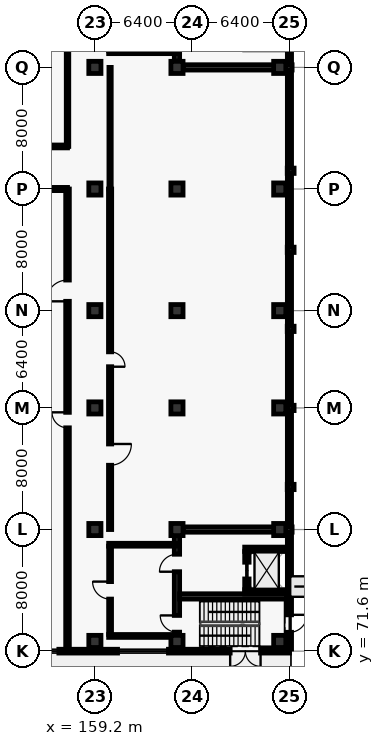
"""IFC4 building model, lengths in metres.
Left out: names, types, materials, properties, quantities, classifications, styles, units other than length and angle.
Written with IfcOpenShell. Run it as: python <this file> out.ifc"""

import sys

from ifc_helpers import new_model, si_unit, direction, frame, frame_2d, origin, origin_2d, place, context, subcontext, project, spatial, rectangle, extrude, element, fill, save


model = new_model("IFC4")
c1 = context("Model", 3, precision=1e-05, world=origin(), true_north=direction((0.0, 1.0)))
c2 = subcontext(c1, "Body", "Model", "MODEL_VIEW")
j1 = project(units=[si_unit("LENGTHUNIT", "METRE"), si_unit("PLANEANGLEUNIT", "RADIAN")], contexts=[c1])
p1 = place(None, origin())
s1 = spatial("IfcSite", under=j1, at=p1, CompositionType="ELEMENT")
p2 = place(p1, origin())
s2 = spatial("IfcBuilding", under=s1, at=p2, CompositionType="ELEMENT")
p3 = place(p2, origin())
s3 = spatial("IfcBuildingStorey", under=s2, at=p3, CompositionType="ELEMENT", Elevation=0.0)
for number, where, z_axis, x_axis in (
    (1, (159.2, 72.24, 0.0), (0.0, 0.0, 1.0), (1.0, 0.0, 0.0)),
    (2, (159.2, 79.6, 0.0), (0.0, 0.0, 1.0), (1.0, 0.0, 0.0)),
    (3, (159.2, 87.6, 0.0), (0.0, 0.0, 1.0), (1.0, 0.0, 0.0)),
    (4, (159.2, 94.0, 0.0), (0.0, 0.0, 1.0), (1.0, 0.0, 0.0)),
    (5, (159.2, 102.0, 0.0), (0.0, 0.0, 1.0), (1.0, 0.0, 0.0)),
    (6, (159.2, 110.0, 0.0), (0.0, 0.0, 1.0), (1.0, 0.0, 0.0)),
    (7, (164.6, 72.24, 0.0), (0.0, 0.0, 1.0), (1.0, 0.0, 0.0)),
    (8, (164.6, 79.6, 0.0), (0.0, 0.0, 1.0), (1.0, 0.0, 0.0)),
    (9, (164.6, 87.6, 0.0), (0.0, 0.0, 1.0), (1.0, 0.0, 0.0)),
    (10, (164.6, 94.0, 0.0), (0.0, 0.0, 1.0), (1.0, 0.0, 0.0)),
    (11, (164.6, 102.0, 0.0), (0.0, 0.0, 1.0), (1.0, 0.0, 0.0)),
    (12, (164.6, 110.0, 0.0), (0.0, 0.0, 1.0), (1.0, 0.0, 0.0)),
    (13, (171.36, 72.24, 0.0), (0.0, 0.0, 1.0), (1.0, 0.0, 0.0)),
    (14, (171.36, 79.6, 0.0), (0.0, 0.0, 1.0), (1.0, 0.0, 0.0)),
    (15, (171.36, 87.6, 0.0), (0.0, 0.0, 1.0), (1.0, 0.0, 0.0)),
    (16, (171.36, 94.0, 0.0), (0.0, 0.0, 1.0), (1.0, 0.0, 0.0)),
    (17, (171.36, 102.0, 0.0), (0.0, 0.0, 1.0), (1.0, 0.0, 0.0)),
    (18, (171.36, 110.0, 0.0), (0.0, 0.0, 1.0), (1.0, 0.0, 0.0)),
):
    element("IfcColumn", number, at=place(p3, frame(where, z_axis=z_axis, x_axis=x_axis)), inside=s3, PredefinedType="COLUMN", context=c2, shape_type="SweptSolid", body=[
        extrude(rectangle(XDim=0.8, YDim=0.8, at=origin_2d()), origin(), (0.0, 0.0, 1.0), 5.4),
    ])
for number, where, z_axis, x_axis in (
    (19, (172.08, 82.4, 0.0), (0.0, 0.0, 1.0), (1.0, 0.0, 0.0)),
    (20, (172.08, 87.6, 0.0), (0.0, 0.0, 1.0), (1.0, 0.0, 0.0)),
    (21, (172.08, 92.8, 0.0), (0.0, 0.0, 1.0), (1.0, 0.0, 0.0)),
    (22, (172.08, 98.0, 0.0), (0.0, 0.0, 1.0), (1.0, 0.0, 0.0)),
    (23, (172.08, 103.2, 0.0), (0.0, 0.0, 1.0), (1.0, 0.0, 0.0)),
):
    element("IfcColumn", number, at=place(p3, frame(where, z_axis=z_axis, x_axis=x_axis)), inside=s3, PredefinedType="PILASTER", context=c2, shape_type="SweptSolid", body=[
        extrude(rectangle(XDim=0.35, YDim=0.45, at=origin_2d()), origin(), (0.0, 0.0, 1.0), 5.4),
    ])
p4 = place(p3, frame((172.0, 117.86, 0.0), z_axis=(0.0, 0.0, 1.0), x_axis=(0.0, -1.0, 0.0)))
e24 = element("IfcWall", 24, at=p4, inside=s3, PredefinedType="SOLIDWALL", context=c2, shape_type="SweptSolid", body=[
    extrude(rectangle(XDim=46.12, YDim=0.275, at=frame_2d((23.06, 0.0))), origin(), (0.0, 0.0, 1.0), 5.14),
])
p5 = place(p4, frame((43.87, 0.0, 0.0)))
e25 = element("IfcOpeningElement", 25, at=p5, cuts=e24, PredefinedType="OPENING", context=c2, shape_type="SweptSolid", body=[
    extrude(rectangle(XDim=1.15, YDim=2.2, at=frame_2d((0.575, 1.1))), frame((0.0, 0.147, 0.0), z_axis=(0.0, -1.0, 0.0), x_axis=(1.0, 0.0, 0.0)), (0.0, 0.0, 1.0), 0.295),
])
p6 = place(p4, frame((1.1, 0.0, 0.0)))
e26 = element("IfcOpeningElement", 26, at=p6, cuts=e24, PredefinedType="OPENING", context=c2, shape_type="SweptSolid", body=[
    extrude(rectangle(XDim=1.15, YDim=2.2, at=frame_2d((0.575, 1.1))), frame((0.0, 0.147, 0.0), z_axis=(0.0, -1.0, 0.0), x_axis=(1.0, 0.0, 0.0)), (0.0, 0.0, 1.0), 0.295),
])
p7 = place(p3, frame((172.0, 71.6, 0.0), z_axis=(0.0, 0.0, 1.0), x_axis=(-1.0, 0.0, 0.0)))
e27 = element("IfcWall", 27, at=p7, inside=s3, PredefinedType="SOLIDWALL", context=c2, shape_type="SweptSolid", body=[
    extrude(rectangle(XDim=32.4, YDim=0.25, at=frame_2d((16.2, 0.0))), origin(), (0.0, 0.0, 1.0), 4.45),
])
p8 = place(p7, frame((1.9, 0.0, 0.0)))
e28 = element("IfcOpeningElement", 28, at=p8, cuts=e27, PredefinedType="OPENING", context=c2, shape_type="SweptSolid", body=[
    extrude(rectangle(XDim=2.0, YDim=2.5, at=frame_2d((1.0, 1.25))), frame((0.0, 0.135, 0.0), z_axis=(0.0, -1.0, 0.0), x_axis=(1.0, 0.0, 0.0)), (0.0, 0.0, 1.0), 0.27),
])
p9 = place(p7, frame((7.96, 0.0, 0.8)))
e29 = element("IfcOpeningElement", 29, at=p9, cuts=e27, PredefinedType="OPENING", context=c2, shape_type="SweptSolid", body=[
    extrude(rectangle(XDim=3.35, YDim=2.9, at=frame_2d((1.675, 1.45))), frame((0.0, 0.135, 0.0), z_axis=(0.0, -1.0, 0.0), x_axis=(1.0, 0.0, 0.0)), (0.0, 0.0, 1.0), 0.27),
])
p10 = place(p7, frame((15.17, 0.0, 0.8)))
e30 = element("IfcOpeningElement", 30, at=p10, cuts=e27, PredefinedType="OPENING", context=c2, shape_type="SweptSolid", body=[
    extrude(rectangle(XDim=3.65, YDim=2.9, at=frame_2d((1.825, 1.45))), frame((0.0, 0.135, 0.0), z_axis=(0.0, -1.0, 0.0), x_axis=(1.0, 0.0, 0.0)), (0.0, 0.0, 1.0), 0.27),
])
p11 = place(p7, frame((19.48, 0.0, 0.8)))
e31 = element("IfcOpeningElement", 31, at=p11, cuts=e27, PredefinedType="OPENING", context=c2, shape_type="SweptSolid", body=[
    extrude(rectangle(XDim=1.4, YDim=2.1, at=frame_2d((0.7, 1.05))), frame((0.0, 0.135, 0.0), z_axis=(0.0, -1.0, 0.0), x_axis=(1.0, 0.0, 0.0)), (0.0, 0.0, 1.0), 0.27),
])
p12 = place(p7, frame((25.24, 0.0, 0.8)))
e32 = element("IfcOpeningElement", 32, at=p12, cuts=e27, PredefinedType="OPENING", context=c2, shape_type="SweptSolid", body=[
    extrude(rectangle(XDim=1.5, YDim=2.1, at=frame_2d((0.75, 1.05))), frame((0.0, 0.135, 0.0), z_axis=(0.0, -1.0, 0.0), x_axis=(1.0, 0.0, 0.0)), (0.0, 0.0, 1.0), 0.27),
])
p13 = place(p3, frame((165.002, 79.6, 0.0), z_axis=(0.0, 0.0, 1.0), x_axis=(1.0, 0.0, 0.0)))
e33 = element("IfcWall", 33, at=p13, inside=s3, PredefinedType="SHEAR", context=c2, shape_type="SweptSolid", body=[
    extrude(rectangle(XDim=7.173, YDim=0.35, at=frame_2d((3.586, 0.0))), origin(), (0.0, 0.0, 1.0), 5.14),
])
p14 = place(p3, frame((164.6, 71.775, 0.0), z_axis=(0.0, 0.0, 1.0), x_axis=(0.0, 1.0, 0.0)))
e34 = element("IfcWall", 34, at=p14, inside=s3, PredefinedType="SHEAR", context=c2, shape_type="SweptSolid", body=[
    extrude(rectangle(XDim=7.423, YDim=0.35, at=frame_2d((3.711, 0.0))), origin(), (0.0, 0.0, 1.0), 5.14),
])
p15 = place(p14, frame((1.075, 0.0, 0.0)))
e35 = element("IfcOpeningElement", 35, at=p15, cuts=e34, PredefinedType="OPENING", context=c2, shape_type="SweptSolid", body=[
    extrude(rectangle(XDim=1.1, YDim=2.15, at=frame_2d((0.55, 1.075))), frame((0.0, 0.185, 0.0), z_axis=(0.0, -1.0, 0.0), x_axis=(1.0, 0.0, 0.0)), (0.0, 0.0, 1.0), 0.37),
])
p16 = place(p14, frame((5.05, 0.0, 0.0)))
e36 = element("IfcOpeningElement", 36, at=p16, cuts=e34, PredefinedType="OPENING", context=c2, shape_type="SweptSolid", body=[
    extrude(rectangle(XDim=1.15, YDim=2.2, at=frame_2d((0.575, 1.1))), frame((0.0, 0.185, 0.0), z_axis=(0.0, -1.0, 0.0), x_axis=(1.0, 0.0, 0.0)), (0.0, 0.0, 1.0), 0.37),
])
p17 = place(p3, frame((164.775, 75.2, 0.0), z_axis=(0.0, 0.0, 1.0), x_axis=(1.0, 0.0, 0.0)))
e37 = element("IfcWall", 37, at=p17, inside=s3, PredefinedType="SHEAR", context=c2, shape_type="SweptSolid", body=[
    extrude(rectangle(XDim=7.05, YDim=0.35, at=frame_2d((3.525, 0.0))), origin(), (0.0, 0.0, 1.0), 5.14),
])
for number, where, z_axis, x_axis in (
    (38, (169.055, 75.5, 0.0), (0.0, 0.0, 1.0), (1.0, 0.0, 0.0)),
    (39, (169.055, 78.3, 0.0), (0.0, 0.0, 1.0), (1.0, 0.0, 0.0)),
):
    element("IfcWall", number, at=place(p3, frame(where, z_axis=z_axis, x_axis=x_axis)), inside=s3, PredefinedType="SHEAR", context=c2, shape_type="SweptSolid", body=[
        extrude(rectangle(XDim=2.89, YDim=0.29, at=frame_2d((1.445, 0.0))), origin(), (0.0, 0.0, 1.0), 5.14),
    ])
p18 = place(p3, frame((169.2, 75.645, 0.0), z_axis=(0.0, 0.0, 1.0), x_axis=(0.0, 1.0, 0.0)))
e40 = element("IfcWall", 40, at=p18, inside=s3, PredefinedType="SHEAR", context=c2, shape_type="SweptSolid", body=[
    extrude(rectangle(XDim=2.51, YDim=0.29, at=frame_2d((1.255, 0.0))), origin(), (0.0, 0.0, 1.0), 5.14),
])
p19 = place(p18, frame((0.705, 0.0, 0.0)))
e41 = element("IfcOpeningElement", 41, at=p19, cuts=e40, PredefinedType="OPENING", context=c2, shape_type="SweptSolid", body=[
    extrude(rectangle(XDim=1.1, YDim=2.15, at=frame_2d((0.55, 1.075))), frame((0.0, 0.155, 0.0), z_axis=(0.0, -1.0, 0.0), x_axis=(1.0, 0.0, 0.0)), (0.0, 0.0, 1.0), 0.31),
])
p20 = place(p3, frame((160.105, 72.6, 0.0), z_axis=(0.0, 0.0, 1.0), x_axis=(1.0, 0.0, 0.0)))
e42 = element("IfcWall", 42, at=p20, inside=s3, PredefinedType="PARTITIONING", context=c2, shape_type="SweptSolid", body=[
    extrude(rectangle(XDim=4.093, YDim=0.19, at=frame_2d((2.046, 0.0))), origin(), (0.0, 0.0, 1.0), 4.49),
])
p21 = place(p3, frame((160.105, 78.6, 0.0), z_axis=(0.0, 0.0, 1.0), x_axis=(1.0, 0.0, 0.0)))
e43 = element("IfcWall", 43, at=p21, inside=s3, PredefinedType="PARTITIONING", context=c2, shape_type="SweptSolid", body=[
    extrude(rectangle(XDim=4.495, YDim=0.19, at=frame_2d((2.248, 0.0))), origin(), (0.0, 0.0, 1.0), 5.14),
])
p22 = place(p3, frame((160.2, 72.695, 0.0), z_axis=(0.0, 0.0, 1.0), x_axis=(0.0, 1.0, 0.0)))
e44 = element("IfcWall", 44, at=p22, inside=s3, PredefinedType="PARTITIONING", context=c2, shape_type="SweptSolid", body=[
    extrude(rectangle(XDim=5.81, YDim=0.19, at=frame_2d((2.905, 0.0))), origin(), (0.0, 0.0, 1.0), 5.14),
])
p23 = place(p22, frame((2.33, 0.0, 0.0)))
e45 = element("IfcOpeningElement", 45, at=p23, cuts=e44, PredefinedType="OPENING", context=c2, shape_type="SweptSolid", body=[
    extrude(rectangle(XDim=1.15, YDim=2.2, at=frame_2d((0.575, 1.1))), frame((0.0, 0.105, 0.0), z_axis=(0.0, -1.0, 0.0), x_axis=(1.0, 0.0, 0.0)), (0.0, 0.0, 1.0), 0.21),
])
p24 = place(p3, frame((165.002, 110.0, 0.0), z_axis=(0.0, 0.0, 1.0), x_axis=(1.0, 0.0, 0.0)))
e46 = element("IfcWall", 46, at=p24, inside=s3, PredefinedType="SHEAR", context=c2, shape_type="SweptSolid", body=[
    extrude(rectangle(XDim=7.173, YDim=0.35, at=frame_2d((3.586, 0.0))), origin(), (0.0, 0.0, 1.0), 5.14),
])
p25 = place(p3, frame((164.6, 110.402, 0.0), z_axis=(0.0, 0.0, 1.0), x_axis=(0.0, 1.0, 0.0)))
e47 = element("IfcWall", 47, at=p25, inside=s3, PredefinedType="SHEAR", context=c2, shape_type="SweptSolid", body=[
    extrude(rectangle(XDim=7.423, YDim=0.35, at=frame_2d((3.711, 0.0))), origin(), (0.0, 0.0, 1.0), 5.14),
])
p26 = place(p25, frame((5.248, 0.0, 0.0)))
e48 = element("IfcOpeningElement", 48, at=p26, cuts=e47, PredefinedType="OPENING", context=c2, shape_type="SweptSolid", body=[
    extrude(rectangle(XDim=1.1, YDim=2.15, at=frame_2d((0.55, 1.075))), frame((0.0, 0.185, 0.0), z_axis=(0.0, -1.0, 0.0), x_axis=(1.0, 0.0, 0.0)), (0.0, 0.0, 1.0), 0.37),
])
p27 = place(p25, frame((1.223, 0.0, 0.0)))
e49 = element("IfcOpeningElement", 49, at=p27, cuts=e47, PredefinedType="OPENING", context=c2, shape_type="SweptSolid", body=[
    extrude(rectangle(XDim=1.15, YDim=2.2, at=frame_2d((0.575, 1.1))), frame((0.0, 0.185, 0.0), z_axis=(0.0, -1.0, 0.0), x_axis=(1.0, 0.0, 0.0)), (0.0, 0.0, 1.0), 0.37),
])
p28 = place(p3, frame((160.105, 111.0, 0.0), z_axis=(0.0, 0.0, 1.0), x_axis=(1.0, 0.0, 0.0)))
e50 = element("IfcWall", 50, at=p28, inside=s3, PredefinedType="PARTITIONING", context=c2, shape_type="SweptSolid", body=[
    extrude(rectangle(XDim=4.495, YDim=0.19, at=frame_2d((2.248, 0.0))), origin(), (0.0, 0.0, 1.0), 5.14),
])
p29 = place(p3, frame((157.4, 102.0, 0.0), z_axis=(0.0, 0.0, 1.0), x_axis=(-1.0, 0.0, 0.0)))
e51 = element("IfcWall", 51, at=p29, inside=s3, PredefinedType="PARTITIONING", context=c2, shape_type="SweptSolid", body=[
    extrude(rectangle(XDim=17.8, YDim=0.21, at=frame_2d((8.9, 0.0))), origin(), (0.0, 0.0, 1.0), 4.49),
])
p30 = place(p3, frame((139.6, 104.8, 0.0), z_axis=(0.0, 0.0, 1.0), x_axis=(1.0, 0.0, 0.0)))
e52 = element("IfcWall", 52, at=p30, inside=s3, PredefinedType="PARTITIONING", context=c2, shape_type="SweptSolid", body=[
    extrude(rectangle(XDim=17.8, YDim=0.19, at=frame_2d((8.9, 0.0))), origin(), (0.0, 0.0, 1.0), 5.14),
])
p31 = place(p30, frame((8.38, 0.0, 0.0)))
e53 = element("IfcOpeningElement", 53, at=p31, cuts=e52, PredefinedType="OPENING", context=c2, shape_type="SweptSolid", body=[
    extrude(rectangle(XDim=1.04, YDim=2.2, at=frame_2d((0.52, 1.1))), frame((0.0, 0.105, 0.0), z_axis=(0.0, -1.0, 0.0), x_axis=(1.0, 0.0, 0.0)), (0.0, 0.0, 1.0), 0.21),
])
p32 = place(p30, frame((13.184, 0.0, 0.0)))
e54 = element("IfcOpeningElement", 54, at=p32, cuts=e52, PredefinedType="OPENING", context=c2, shape_type="SweptSolid", body=[
    extrude(rectangle(XDim=1.4, YDim=2.25, at=frame_2d((0.7, 1.125))), frame((0.0, 0.105, 0.0), z_axis=(0.0, -1.0, 0.0), x_axis=(1.0, 0.0, 0.0)), (0.0, 0.0, 1.0), 0.21),
])
p33 = place(p3, frame((157.4, 104.8, 0.0), z_axis=(0.0, 0.0, 1.0), x_axis=(0.0, 1.0, 0.0)))
e55 = element("IfcWall", 55, at=p33, inside=s3, PredefinedType="PARTITIONING", context=c2, shape_type="SweptSolid", body=[
    extrude(rectangle(XDim=13.2, YDim=0.165, at=frame_2d((6.6, 0.0))), origin(), (0.0, 0.0, 1.0), 5.14),
])
p34 = place(p3, frame((160.2, 110.0, 0.0), z_axis=(0.0, 0.0, 1.0), x_axis=(0.0, -1.0, 0.0)))
e56 = element("IfcWall", 56, at=p34, inside=s3, PredefinedType="PARTITIONING", context=c2, shape_type="SweptSolid", body=[
    extrude(rectangle(XDim=8.0, YDim=0.15, at=frame_2d((4.0, 0.0))), origin(), (0.0, 0.0, 1.0), 5.14),
])
p35 = place(p3, frame((157.4, 71.6, 0.0), z_axis=(0.0, 0.0, 1.0), x_axis=(0.0, 1.0, 0.0)))
e57 = element("IfcWall", 57, at=p35, inside=s3, PredefinedType="PARTITIONING", context=c2, shape_type="SweptSolid", body=[
    extrude(rectangle(XDim=30.4, YDim=0.24, at=frame_2d((15.2, 0.0))), origin(), (0.0, 0.0, 1.0), 5.14),
])
p36 = place(p35, frame((14.69, 0.0, 0.0)))
e58 = element("IfcOpeningElement", 58, at=p36, cuts=e57, PredefinedType="OPENING", context=c2, shape_type="SweptSolid", body=[
    extrude(rectangle(XDim=1.02, YDim=2.1, at=frame_2d((0.51, 1.05))), frame((0.0, 0.13, 0.0), z_axis=(0.0, -1.0, 0.0), x_axis=(1.0, 0.0, 0.0)), (0.0, 0.0, 1.0), 0.26),
])
p37 = place(p35, frame((23.012, 0.0, 0.0)))
e59 = element("IfcOpeningElement", 59, at=p37, cuts=e57, PredefinedType="OPENING", context=c2, shape_type="SweptSolid", body=[
    extrude(rectangle(XDim=1.4, YDim=2.25, at=frame_2d((0.7, 1.125))), frame((0.0, 0.13, 0.0), z_axis=(0.0, -1.0, 0.0), x_axis=(1.0, 0.0, 0.0)), (0.0, 0.0, 1.0), 0.26),
])
p38 = place(p3, frame((160.2, 102.0, 0.0), z_axis=(0.0, 0.0, 1.0), x_axis=(0.0, -1.0, 0.0)))
e60 = element("IfcWall", 60, at=p38, inside=s3, PredefinedType="PARTITIONING", context=c2, shape_type="SweptSolid", body=[
    extrude(rectangle(XDim=22.4, YDim=0.21, at=frame_2d((11.2, 0.0))), origin(), (0.0, 0.0, 1.0), 5.14),
])
p39 = place(p38, frame((10.71, 0.0, 0.0)))
e61 = element("IfcOpeningElement", 61, at=p39, cuts=e60, PredefinedType="OPENING", context=c2, shape_type="SweptSolid", body=[
    extrude(rectangle(XDim=0.98, YDim=2.1, at=frame_2d((0.49, 1.05))), frame((0.0, 0.115, 0.0), z_axis=(0.0, -1.0, 0.0), x_axis=(1.0, 0.0, 0.0)), (0.0, 0.0, 1.0), 0.23),
])
p40 = place(p38, frame((16.772, 0.0, 0.0)))
e62 = element("IfcOpeningElement", 62, at=p40, cuts=e60, PredefinedType="OPENING", context=c2, shape_type="SweptSolid", body=[
    extrude(rectangle(XDim=1.4, YDim=2.25, at=frame_2d((0.7, 1.125))), frame((0.0, 0.115, 0.0), z_axis=(0.0, -1.0, 0.0), x_axis=(1.0, 0.0, 0.0)), (0.0, 0.0, 1.0), 0.23),
])
p41 = place(p5, origin())
e63 = element("IfcDoor", 63, at=p41, inside=s3, OperationType="SINGLE_SWING_LEFT", PredefinedType="DOOR", context=c2, shape_type="SweptSolid", body=[
    extrude(rectangle(XDim=1.15, YDim=2.2, at=frame_2d((0.575, 1.1))), frame((0.0, 0.025, 0.0), z_axis=(0.0, -1.0, 0.0), x_axis=(1.0, 0.0, 0.0)), (0.0, 0.0, 1.0), 0.05),
])
fill(e25, e63)
p42 = place(p8, origin())
e64 = element("IfcDoor", 64, at=p42, inside=s3, OperationType="DOUBLE_SWING_LEFT", PredefinedType="DOOR", context=c2, shape_type="SweptSolid", body=[
    extrude(rectangle(XDim=2.0, YDim=2.5, at=frame_2d((1.0, 1.25))), frame((0.0, 0.025, 0.0), z_axis=(0.0, -1.0, 0.0), x_axis=(1.0, 0.0, 0.0)), (0.0, 0.0, 1.0), 0.05),
])
fill(e28, e64)
p43 = place(p9, origin())
e65 = element("IfcWindow", 65, at=p43, inside=s3, PartitioningType="SINGLE_PANEL", PredefinedType="WINDOW", context=c2, shape_type="SweptSolid", body=[
    extrude(rectangle(XDim=3.35, YDim=2.9, at=frame_2d((1.675, 1.45))), frame((0.0, 0.03, 0.0), z_axis=(0.0, -1.0, 0.0), x_axis=(1.0, 0.0, 0.0)), (0.0, 0.0, 1.0), 0.06),
])
fill(e29, e65)
p44 = place(p10, origin())
e66 = element("IfcWindow", 66, at=p44, inside=s3, PartitioningType="SINGLE_PANEL", PredefinedType="WINDOW", context=c2, shape_type="SweptSolid", body=[
    extrude(rectangle(XDim=3.65, YDim=2.9, at=frame_2d((1.825, 1.45))), frame((0.0, 0.03, 0.0), z_axis=(0.0, -1.0, 0.0), x_axis=(1.0, 0.0, 0.0)), (0.0, 0.0, 1.0), 0.06),
])
fill(e30, e66)
p45 = place(p15, origin())
e67 = element("IfcDoor", 67, at=p45, inside=s3, OperationType="SINGLE_SWING_RIGHT", PredefinedType="DOOR", context=c2, shape_type="SweptSolid", body=[
    extrude(rectangle(XDim=1.1, YDim=2.15, at=frame_2d((0.55, 1.075))), frame((0.0, 0.025, 0.0), z_axis=(0.0, -1.0, 0.0), x_axis=(1.0, 0.0, 0.0)), (0.0, 0.0, 1.0), 0.05),
])
fill(e35, e67)
p46 = place(p16, origin())
e68 = element("IfcDoor", 68, at=p46, inside=s3, OperationType="SINGLE_SWING_LEFT", PredefinedType="DOOR", context=c2, shape_type="SweptSolid", body=[
    extrude(rectangle(XDim=1.15, YDim=2.2, at=frame_2d((0.575, 1.1))), frame((0.0, 0.025, 0.0), z_axis=(0.0, -1.0, 0.0), x_axis=(1.0, 0.0, 0.0)), (0.0, 0.0, 1.0), 0.05),
])
fill(e36, e68)
p47 = place(p19, origin())
e69 = element("IfcDoor", 69, at=p47, inside=s3, OperationType="SLIDING_TO_LEFT", PredefinedType="DOOR", context=c2, shape_type="SweptSolid", body=[
    extrude(rectangle(XDim=1.1, YDim=2.15, at=frame_2d((0.55, 1.075))), frame((0.0, 0.025, 0.0), z_axis=(0.0, -1.0, 0.0), x_axis=(1.0, 0.0, 0.0)), (0.0, 0.0, 1.0), 0.05),
])
fill(e41, e69)
p48 = place(p23, origin())
e70 = element("IfcDoor", 70, at=p48, inside=s3, OperationType="SINGLE_SWING_RIGHT", PredefinedType="DOOR", context=c2, shape_type="SweptSolid", body=[
    extrude(rectangle(XDim=1.15, YDim=2.2, at=frame_2d((0.575, 1.1))), frame((0.0, 0.025, 0.0), z_axis=(0.0, -1.0, 0.0), x_axis=(1.0, 0.0, 0.0)), (0.0, 0.0, 1.0), 0.05),
])
fill(e45, e70)
p49 = place(p36, origin())
e71 = element("IfcDoor", 71, at=p49, inside=s3, OperationType="SINGLE_SWING_RIGHT", PredefinedType="DOOR", context=c2, shape_type="SweptSolid", body=[
    extrude(rectangle(XDim=1.02, YDim=2.1, at=frame_2d((0.51, 1.05))), frame((0.0, 0.025, 0.0), z_axis=(0.0, -1.0, 0.0), x_axis=(1.0, 0.0, 0.0)), (0.0, 0.0, 1.0), 0.05),
])
fill(e58, e71)
p50 = place(p37, origin())
e72 = element("IfcDoor", 72, at=p50, inside=s3, OperationType="SINGLE_SWING_LEFT", PredefinedType="DOOR", context=c2, shape_type="SweptSolid", body=[
    extrude(rectangle(XDim=1.4, YDim=2.25, at=frame_2d((0.7, 1.125))), frame((0.0, 0.025, 0.0), z_axis=(0.0, -1.0, 0.0), x_axis=(1.0, 0.0, 0.0)), (0.0, 0.0, 1.0), 0.05),
])
fill(e59, e72)
p51 = place(p39, origin())
e73 = element("IfcDoor", 73, at=p51, inside=s3, OperationType="SINGLE_SWING_RIGHT", PredefinedType="DOOR", context=c2, shape_type="SweptSolid", body=[
    extrude(rectangle(XDim=0.98, YDim=2.1, at=frame_2d((0.49, 1.05))), frame((0.0, 0.025, 0.0), z_axis=(0.0, -1.0, 0.0), x_axis=(1.0, 0.0, 0.0)), (0.0, 0.0, 1.0), 0.05),
])
fill(e61, e73)
p52 = place(p40, origin())
e74 = element("IfcDoor", 74, at=p52, inside=s3, OperationType="SINGLE_SWING_LEFT", PredefinedType="DOOR", context=c2, shape_type="SweptSolid", body=[
    extrude(rectangle(XDim=1.4, YDim=2.25, at=frame_2d((0.7, 1.125))), frame((0.0, 0.025, 0.0), z_axis=(0.0, -1.0, 0.0), x_axis=(1.0, 0.0, 0.0)), (0.0, 0.0, 1.0), 0.05),
])
fill(e62, e74)
save(model, sys.argv[1])
